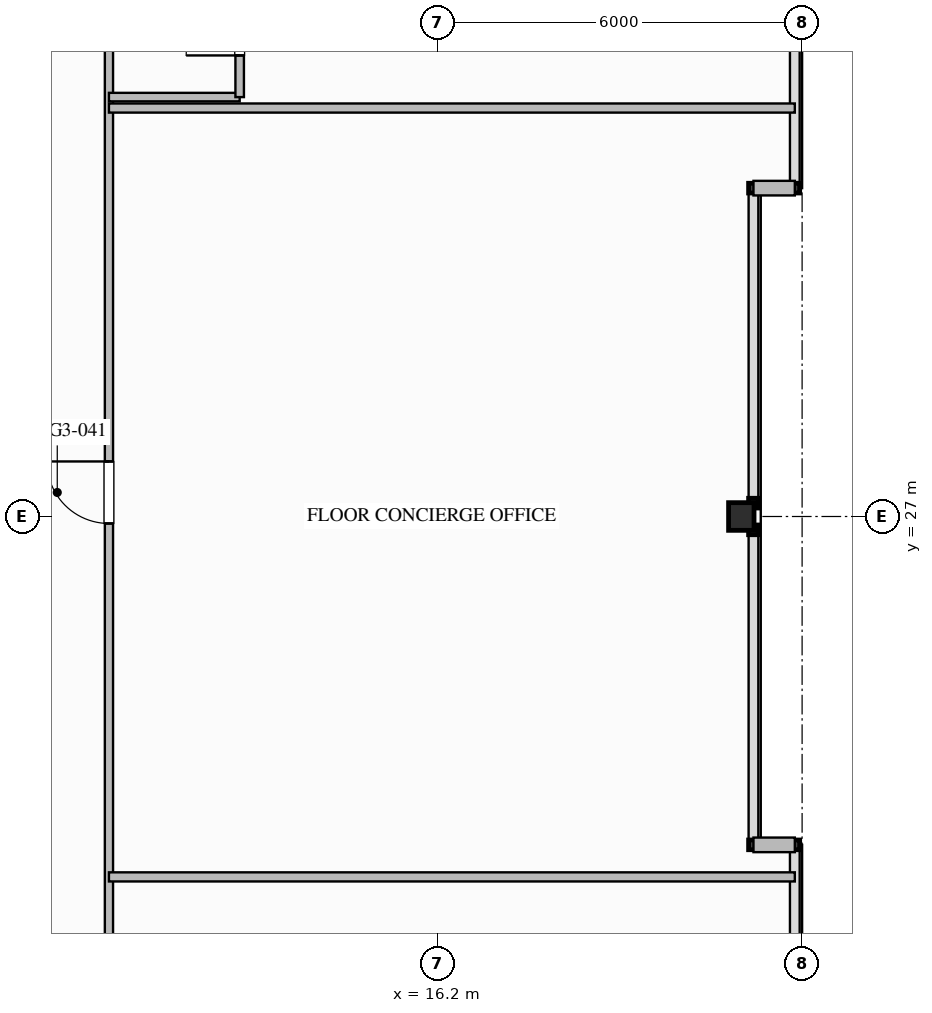
"""IFC4 building model, lengths in metres.
Left out: names, types, materials, properties, quantities, classifications, styles, units other than length and angle.
Written with IfcOpenShell. Run it as: python <this file> out.ifc"""

import sys

from ifc_helpers import new_model, si_unit, direction, frame, frame_2d, origin, origin_2d, place, context, subcontext, project, spatial, rectangle, i_section, extrude, element, fill, save


model = new_model("IFC4")
c1 = context("Model", 3, precision=1e-05, world=origin(), true_north=direction((0.0, 1.0)))
c2 = subcontext(c1, "Body", "Model", "MODEL_VIEW")
j1 = project(units=[si_unit("LENGTHUNIT", "METRE"), si_unit("PLANEANGLEUNIT", "RADIAN")], contexts=[c1])
p1 = place(None, origin())
s1 = spatial("IfcSite", under=j1, at=p1, CompositionType="ELEMENT")
p2 = place(p1, origin())
s2 = spatial("IfcBuilding", under=s1, at=p2, CompositionType="ELEMENT")
p3 = place(p2, frame((0.0, 0.0, 112.8)))
s3 = spatial("IfcBuildingStorey", under=s2, at=p3, CompositionType="ELEMENT", Elevation=112.8)
p4 = place(p3, frame((21.2, 27.0, 0.0), z_axis=(0.0, 0.0, 1.0), x_axis=(1.0, 0.0, 0.0)))
e1 = element("IfcColumn", 1, at=p4, inside=s3, PredefinedType="COLUMN", context=c2, shape_type="SweptSolid", body=[
    extrude(i_section(OverallWidth=0.418, OverallDepth=0.455, WebThickness=0.042, FlangeThickness=0.068, FilletRadius=0.03, at=origin_2d()), origin(), (0.0, 0.0, 1.0), 3.497),
])
for number, where, z_axis, x_axis in (
    (2, (22.08, 32.4, 0.0), (0.0, 0.0, 1.0), (-1.0, 0.0, 0.0)),
    (3, (21.4, 21.6, 0.0), (0.0, 0.0, 1.0), (1.0, 0.0, 0.0)),
):
    element("IfcWall", number, at=place(p3, frame(where, z_axis=z_axis, x_axis=x_axis)), inside=s3, PredefinedType="STANDARD", context=c2, shape_type="SweptSolid", body=[
        extrude(rectangle(XDim=0.68, YDim=0.24, at=frame_2d((0.34, 0.0))), origin(), (0.0, 0.0, 1.0), 3.24),
    ])
p5 = place(p3, frame((10.8, 10.8, 0.0), z_axis=(0.0, 0.0, 1.0), x_axis=(0.0, 1.0, 0.0)))
e4 = element("IfcWall", 4, at=p5, inside=s3, PredefinedType="PARTITIONING", context=c2, shape_type="SweptSolid", body=[
    extrude(rectangle(XDim=32.4, YDim=0.135, at=frame_2d((16.2, 0.0))), origin(), (0.0, 0.0, 1.0), 3.24),
])
p6 = place(p5, frame((5.722, 0.0, 0.0)))
e5 = element("IfcOpeningElement", 5, at=p6, cuts=e4, PredefinedType="OPENING", context=c2, shape_type="SweptSolid", body=[
    extrude(rectangle(XDim=1.26, YDim=2.2, at=frame_2d((0.63, 1.1))), frame((0.0, 0.077, 0.0), z_axis=(0.0, -1.0, 0.0), x_axis=(1.0, 0.0, 0.0)), (0.0, 0.0, 1.0), 0.155),
])
p7 = place(p5, frame((16.085, 0.0, 0.0)))
e6 = element("IfcOpeningElement", 6, at=p7, cuts=e4, PredefinedType="OPENING", context=c2, shape_type="SweptSolid", body=[
    extrude(rectangle(XDim=1.02, YDim=2.15, at=frame_2d((0.51, 1.075))), frame((0.0, 0.077, 0.0), z_axis=(0.0, -1.0, 0.0), x_axis=(1.0, 0.0, 0.0)), (0.0, 0.0, 1.0), 0.155),
])
p8 = place(p5, frame((28.244, 0.0, 0.0)))
e7 = element("IfcOpeningElement", 7, at=p8, cuts=e4, PredefinedType="OPENING", context=c2, shape_type="SweptSolid", body=[
    extrude(rectangle(XDim=1.26, YDim=2.2, at=frame_2d((0.63, 1.1))), frame((0.0, 0.077, 0.0), z_axis=(0.0, -1.0, 0.0), x_axis=(1.0, 0.0, 0.0)), (0.0, 0.0, 1.0), 0.155),
])
for number, where, z_axis, x_axis in (
    (8, (10.8, 21.073, 0.0), (0.0, 0.0, 1.0), (1.0, 0.0, 0.0)),
    (9, (10.8, 33.717, 0.0), (0.0, 0.0, 1.0), (1.0, 0.0, 0.0)),
):
    element("IfcWall", number, at=place(p3, frame(where, z_axis=z_axis, x_axis=x_axis)), inside=s3, PredefinedType="PARTITIONING", context=c2, shape_type="SweptSolid", body=[
        extrude(rectangle(XDim=11.28, YDim=0.15, at=frame_2d((5.64, 0.0))), origin(), (0.0, 0.0, 1.0), 3.24),
    ])
p9 = place(p3, frame((10.8, 33.897, 0.0), z_axis=(0.0, 0.0, 1.0), x_axis=(1.0, 0.0, 0.0)))
e10 = element("IfcWall", 10, at=p9, inside=s3, PredefinedType="PLUMBINGWALL", context=c2, shape_type="SweptSolid", body=[
    extrude(rectangle(XDim=2.15, YDim=0.14, at=frame_2d((1.075, 0.0))), origin(), (0.0, 0.0, 1.0), 3.24),
])
p10 = place(p3, frame((12.95, 33.897, 0.0), z_axis=(0.0, 0.0, 1.0), x_axis=(0.0, 1.0, 0.0)))
e11 = element("IfcWall", 11, at=p10, inside=s3, PredefinedType="PLUMBINGWALL", context=c2, shape_type="SweptSolid", body=[
    extrude(rectangle(XDim=2.25, YDim=0.14, at=frame_2d((1.125, 0.0))), origin(), (0.0, 0.0, 1.0), 3.24),
])
p11 = place(p10, frame((0.685, 0.0, 0.0)))
e12 = element("IfcOpeningElement", 12, at=p11, cuts=e11, PredefinedType="OPENING", context=c2, shape_type="SweptSolid", body=[
    extrude(rectangle(XDim=0.88, YDim=2.1, at=frame_2d((0.44, 1.05))), frame((0.0, 0.08, 0.0), z_axis=(0.0, -1.0, 0.0), x_axis=(1.0, 0.0, 0.0)), (0.0, 0.0, 1.0), 0.16),
])
p12 = place(p7, origin())
e13 = element("IfcDoor", 13, at=p12, inside=s3, OperationType="SINGLE_SWING_RIGHT", PredefinedType="DOOR", context=c2, shape_type="SweptSolid", body=[
    extrude(rectangle(XDim=1.02, YDim=2.15, at=frame_2d((0.51, 1.075))), frame((0.0, 0.025, 0.0), z_axis=(0.0, -1.0, 0.0), x_axis=(1.0, 0.0, 0.0)), (0.0, 0.0, 1.0), 0.05),
])
fill(e6, e13)
p13 = place(p11, origin())
e14 = element("IfcDoor", 14, at=p13, inside=s3, OperationType="SINGLE_SWING_LEFT", PredefinedType="DOOR", context=c2, shape_type="SweptSolid", body=[
    extrude(rectangle(XDim=0.88, YDim=2.1, at=frame_2d((0.44, 1.05))), frame((0.0, 0.025, 0.0), z_axis=(0.0, -1.0, 0.0), x_axis=(1.0, 0.0, 0.0)), (0.0, 0.0, 1.0), 0.05),
])
fill(e12, e14)
save(model, sys.argv[1])
